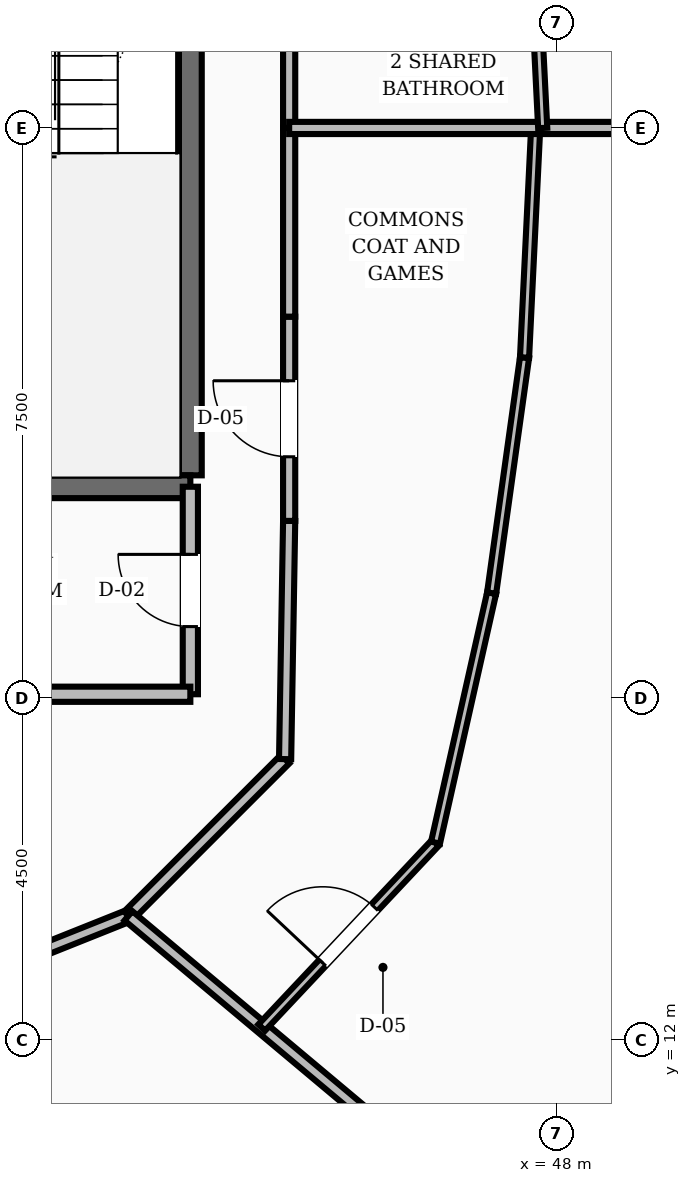
"""IFC4 building model, lengths in metres.
Left out: names, types, materials, properties, quantities, classifications, styles, units other than length and angle.
Written with IfcOpenShell. Run it as: python <this file> out.ifc"""

import sys

from ifc_helpers import new_model, si_unit, direction, frame, frame_2d, origin, place, context, subcontext, project, spatial, rectangle, extrude, element, fill, save


model = new_model("IFC4")
c1 = context("Model", 3, precision=1e-05, world=origin(), true_north=direction((0.0, 1.0)))
c2 = subcontext(c1, "Body", "Model", "MODEL_VIEW")
j1 = project(units=[si_unit("LENGTHUNIT", "METRE"), si_unit("PLANEANGLEUNIT", "RADIAN")], contexts=[c1])
p1 = place(None, origin())
s1 = spatial("IfcSite", under=j1, at=p1, CompositionType="ELEMENT")
p2 = place(p1, origin())
s2 = spatial("IfcBuilding", under=s1, at=p2, CompositionType="ELEMENT")
p3 = place(p2, frame((0.0, 0.0, 232.8)))
s3 = spatial("IfcBuildingStorey", under=s2, at=p3, CompositionType="ELEMENT", Elevation=232.8)
p4 = place(p3, frame((43.18, 19.43, 0.0), z_axis=(0.0, 0.0, 1.0), x_axis=(0.0, 1.0, 0.0)))
e1 = element("IfcWall", 1, at=p4, inside=s3, PredefinedType="SHEAR", context=c2, shape_type="SweptSolid", body=[
    extrude(rectangle(XDim=8.74, YDim=0.3, at=frame_2d((4.37, 0.0))), origin(), (0.0, 0.0, 1.0), 3.6),
])
p5 = place(p3, frame((39.58, 19.28, 0.0), z_axis=(0.0, 0.0, 1.0), x_axis=(1.0, 0.0, 0.0)))
e2 = element("IfcWall", 2, at=p5, inside=s3, PredefinedType="SHEAR", context=c2, shape_type="SweptSolid", body=[
    extrude(rectangle(XDim=3.6, YDim=0.3, at=frame_2d((1.8, 0.0))), origin(), (0.0, 0.0, 1.0), 3.6),
])
p6 = place(p3, frame((43.18, 16.55, 0.0), z_axis=(0.0, 0.0, 1.0), x_axis=(0.0, 1.0, 0.0)))
e3 = element("IfcWall", 3, at=p6, inside=s3, PredefinedType="SOLIDWALL", context=c2, shape_type="SweptSolid", body=[
    extrude(rectangle(XDim=2.73, YDim=0.2, at=frame_2d((1.365, 0.0))), origin(), (0.0, 0.0, 1.0), 2.87),
])
p7 = place(p6, frame((0.89, 0.0, 0.0)))
e4 = element("IfcOpeningElement", 4, at=p7, cuts=e3, PredefinedType="OPENING", context=c2, shape_type="SweptSolid", body=[
    extrude(rectangle(XDim=0.95, YDim=2.1, at=frame_2d((0.475, 1.05))), frame((0.0, 0.11, 0.0), z_axis=(0.0, -1.0, 0.0), x_axis=(1.0, 0.0, 0.0)), (0.0, 0.0, 1.0), 0.22),
])
p8 = place(p3, frame((39.2, 16.55, 0.0), z_axis=(0.0, 0.0, 1.0), x_axis=(1.0, 0.0, 0.0)))
e5 = element("IfcWall", 5, at=p8, inside=s3, PredefinedType="SOLIDWALL", context=c2, shape_type="SweptSolid", body=[
    extrude(rectangle(XDim=3.98, YDim=0.2, at=frame_2d((1.99, 0.0))), origin(), (0.0, 0.0, 1.0), 2.87),
])
p9 = place(p3, frame((44.48, 24.0, 0.0), z_axis=(0.0, 0.0, 1.0), x_axis=(0.0, 1.0, 0.0)))
e6 = element("IfcWall", 6, at=p9, inside=s3, PredefinedType="SOLIDWALL", context=c2, shape_type="SweptSolid", body=[
    extrude(rectangle(XDim=2.482, YDim=0.16, at=frame_2d((1.241, 0.0))), origin(), (0.0, 0.0, 1.0), 2.87),
])
p10 = place(p3, frame((39.651, 12.55, 0.0), z_axis=(0.0, 0.0, 1.0), x_axis=(0.92856882165, 0.371160266542, 0.0)))
e7 = element("IfcWall", 7, at=p10, inside=s3, PredefinedType="SOLIDWALL", context=c2, shape_type="SweptSolid", body=[
    extrude(rectangle(XDim=2.923, YDim=0.16, at=frame_2d((1.461, 0.0))), origin(), (0.0, 0.0, 1.0), 2.87),
])
p11 = place(p3, frame((42.365, 13.635, 0.0), z_axis=(0.0, 0.0, 1.0), x_axis=(0.707106781187, 0.707106781187, 0.0)))
e8 = element("IfcWall", 8, at=p11, inside=s3, PredefinedType="SOLIDWALL", context=c2, shape_type="SweptSolid", body=[
    extrude(rectangle(XDim=2.916, YDim=0.16, at=frame_2d((1.458, 0.0))), origin(), (0.0, 0.0, 1.0), 2.87),
])
p12 = place(p3, frame((44.427, 15.697, 0.0), z_axis=(0.0, 0.0, 1.0), x_axis=(0.016981035134, 0.999855811828, 0.0)))
e9 = element("IfcWall", 9, at=p12, inside=s3, PredefinedType="SOLIDWALL", context=c2, shape_type="SweptSolid", body=[
    extrude(rectangle(XDim=3.134, YDim=0.16, at=frame_2d((1.567, 0.0))), origin(), (0.0, 0.0, 1.0), 2.87),
])
p13 = place(p3, frame((44.48, 18.831, 0.0), z_axis=(0.0, 0.0, 1.0), x_axis=(0.0, 1.0, 0.0)))
e10 = element("IfcWall", 10, at=p13, inside=s3, PredefinedType="SOLIDWALL", context=c2, shape_type="SweptSolid", body=[
    extrude(rectangle(XDim=2.687, YDim=0.16, at=frame_2d((1.344, 0.0))), origin(), (0.0, 0.0, 1.0), 2.87),
])
p14 = place(p13, frame((0.844, 0.0, 0.0)))
e11 = element("IfcOpeningElement", 11, at=p14, cuts=e10, PredefinedType="OPENING", context=c2, shape_type="SweptSolid", body=[
    extrude(rectangle(XDim=1.0, YDim=2.1, at=frame_2d((0.5, 1.05))), frame((0.0, 0.09, 0.0), z_axis=(0.0, -1.0, 0.0), x_axis=(1.0, 0.0, 0.0)), (0.0, 0.0, 1.0), 0.18),
])
p15 = place(p3, frame((44.48, 21.518, 0.0), z_axis=(0.0, 0.0, 1.0), x_axis=(0.0, 1.0, 0.0)))
e12 = element("IfcWall", 12, at=p15, inside=s3, PredefinedType="SOLIDWALL", context=c2, shape_type="SweptSolid", body=[
    extrude(rectangle(XDim=2.482, YDim=0.16, at=frame_2d((1.241, 0.0))), origin(), (0.0, 0.0, 1.0), 2.87),
])
p16 = place(p3, frame((42.365, 13.635, 0.0), z_axis=(0.0, 0.0, 1.0), x_axis=(0.766438880931, -0.642317243889, 0.0)))
e13 = element("IfcWall", 13, at=p16, inside=s3, PredefinedType="SOLIDWALL", context=c2, shape_type="SweptSolid", body=[
    extrude(rectangle(XDim=6.489, YDim=0.16, at=frame_2d((3.245, 0.0))), origin(), (0.0, 0.0, 1.0), 2.87),
])
p17 = place(p3, frame((44.119, 12.165, 0.0), z_axis=(0.0, 0.0, 1.0), x_axis=(0.684903797097, 0.728633507823, 0.0)))
e14 = element("IfcWall", 14, at=p17, inside=s3, PredefinedType="PARTITIONING", context=c2, shape_type="SweptSolid", body=[
    extrude(rectangle(XDim=3.339, YDim=0.12, at=frame_2d((1.669, 0.0))), origin(), (0.0, 0.0, 1.0), 2.87),
])
p18 = place(p17, frame((1.169, 0.0, 0.0)))
e15 = element("IfcOpeningElement", 15, at=p18, cuts=e14, PredefinedType="OPENING", context=c2, shape_type="SweptSolid", body=[
    extrude(rectangle(XDim=1.0, YDim=2.1, at=frame_2d((0.5, 1.05))), frame((0.0, 0.07, 0.0), z_axis=(0.0, -1.0, 0.0), x_axis=(1.0, 0.0, 0.0)), (0.0, 0.0, 1.0), 0.14),
])
p19 = place(p3, frame((46.406, 14.598, 0.0), z_axis=(0.0, 0.0, 1.0), x_axis=(0.219303315939, 0.975656730422, 0.0)))
e16 = element("IfcWall", 16, at=p19, inside=s3, PredefinedType="PARTITIONING", context=c2, shape_type="SweptSolid", body=[
    extrude(rectangle(XDim=3.365, YDim=0.12, at=frame_2d((1.683, 0.0))), origin(), (0.0, 0.0, 1.0), 2.87),
])
p20 = place(p3, frame((47.144, 17.881, 0.0), z_axis=(0.0, 0.0, 1.0), x_axis=(0.138416734292, 0.990374074614, 0.0)))
e17 = element("IfcWall", 17, at=p20, inside=s3, PredefinedType="PARTITIONING", context=c2, shape_type="SweptSolid", body=[
    extrude(rectangle(XDim=3.129, YDim=0.12, at=frame_2d((1.564, 0.0))), origin(), (0.0, 0.0, 1.0), 2.87),
])
p21 = place(p3, frame((47.577, 20.98, 0.0), z_axis=(0.0, 0.0, 1.0), x_axis=(0.048366932207, 0.998829635057, 0.0)))
e18 = element("IfcWall", 18, at=p21, inside=s3, PredefinedType="PARTITIONING", context=c2, shape_type="SweptSolid", body=[
    extrude(rectangle(XDim=3.023, YDim=0.12, at=frame_2d((1.512, 0.0))), origin(), (0.0, 0.0, 1.0), 2.87),
])
p22 = place(p3, frame((44.48, 24.0, 0.0), z_axis=(0.0, 0.0, 1.0), x_axis=(1.0, 0.0, 0.0)))
e19 = element("IfcWall", 19, at=p22, inside=s3, PredefinedType="SOLIDWALL", context=c2, shape_type="SweptSolid", body=[
    extrude(rectangle(XDim=9.216, YDim=0.16, at=frame_2d((4.608, 0.0))), origin(), (0.0, 0.0, 1.0), 2.87),
])
p23 = place(p3, frame((47.816, 24.0, 0.0), z_axis=(0.0, 0.0, 1.0), x_axis=(-0.049484864646, 0.998774873618, 0.0)))
e20 = element("IfcWall", 20, at=p23, inside=s3, PredefinedType="PARTITIONING", context=c2, shape_type="SweptSolid", body=[
    extrude(rectangle(XDim=3.039, YDim=0.12, at=frame_2d((1.52, 0.0))), origin(), (0.0, 0.0, 1.0), 2.87),
])
p24 = place(p3, frame((49.113, 24.0, 0.0), z_axis=(0.0, 0.0, 1.0), x_axis=(-0.125779473563, 0.992058226129, 0.0)))
e21 = element("IfcWall", 21, at=p24, inside=s3, PredefinedType="PARTITIONING", context=c2, shape_type="SweptSolid", body=[
    extrude(rectangle(XDim=6.578, YDim=0.12, at=frame_2d((3.289, 0.0))), origin(), (0.0, 0.0, 1.0), 2.87),
])
p25 = place(p24, frame((3.859, 0.0, 0.0)))
e22 = element("IfcOpeningElement", 22, at=p25, cuts=e21, PredefinedType="OPENING", context=c2, shape_type="SweptSolid", body=[
    extrude(rectangle(XDim=0.95, YDim=2.1, at=frame_2d((0.475, 1.05))), frame((0.0, 0.07, 0.0), z_axis=(0.0, -1.0, 0.0), x_axis=(1.0, 0.0, 0.0)), (0.0, 0.0, 1.0), 0.14),
])
p26 = place(p7, origin())
e23 = element("IfcDoor", 23, at=p26, inside=s3, OperationType="SINGLE_SWING_RIGHT", PredefinedType="DOOR", context=c2, shape_type="SweptSolid", body=[
    extrude(rectangle(XDim=0.95, YDim=2.1, at=frame_2d((0.475, 1.05))), frame((0.0, 0.025, 0.0), z_axis=(0.0, -1.0, 0.0), x_axis=(1.0, 0.0, 0.0)), (0.0, 0.0, 1.0), 0.05),
])
fill(e4, e23)
p27 = place(p14, origin())
e24 = element("IfcDoor", 24, at=p27, inside=s3, OperationType="SINGLE_SWING_RIGHT", PredefinedType="DOOR", context=c2, shape_type="SweptSolid", body=[
    extrude(rectangle(XDim=1.0, YDim=2.1, at=frame_2d((0.5, 1.05))), frame((0.0, 0.025, 0.0), z_axis=(0.0, -1.0, 0.0), x_axis=(1.0, 0.0, 0.0)), (0.0, 0.0, 1.0), 0.05),
])
fill(e11, e24)
p28 = place(p18, origin())
e25 = element("IfcDoor", 25, at=p28, inside=s3, OperationType="SINGLE_SWING_LEFT", PredefinedType="DOOR", context=c2, shape_type="SweptSolid", body=[
    extrude(rectangle(XDim=1.0, YDim=2.1, at=frame_2d((0.5, 1.05))), frame((0.0, 0.025, 0.0), z_axis=(0.0, -1.0, 0.0), x_axis=(1.0, 0.0, 0.0)), (0.0, 0.0, 1.0), 0.05),
])
fill(e15, e25)
save(model, sys.argv[1])
